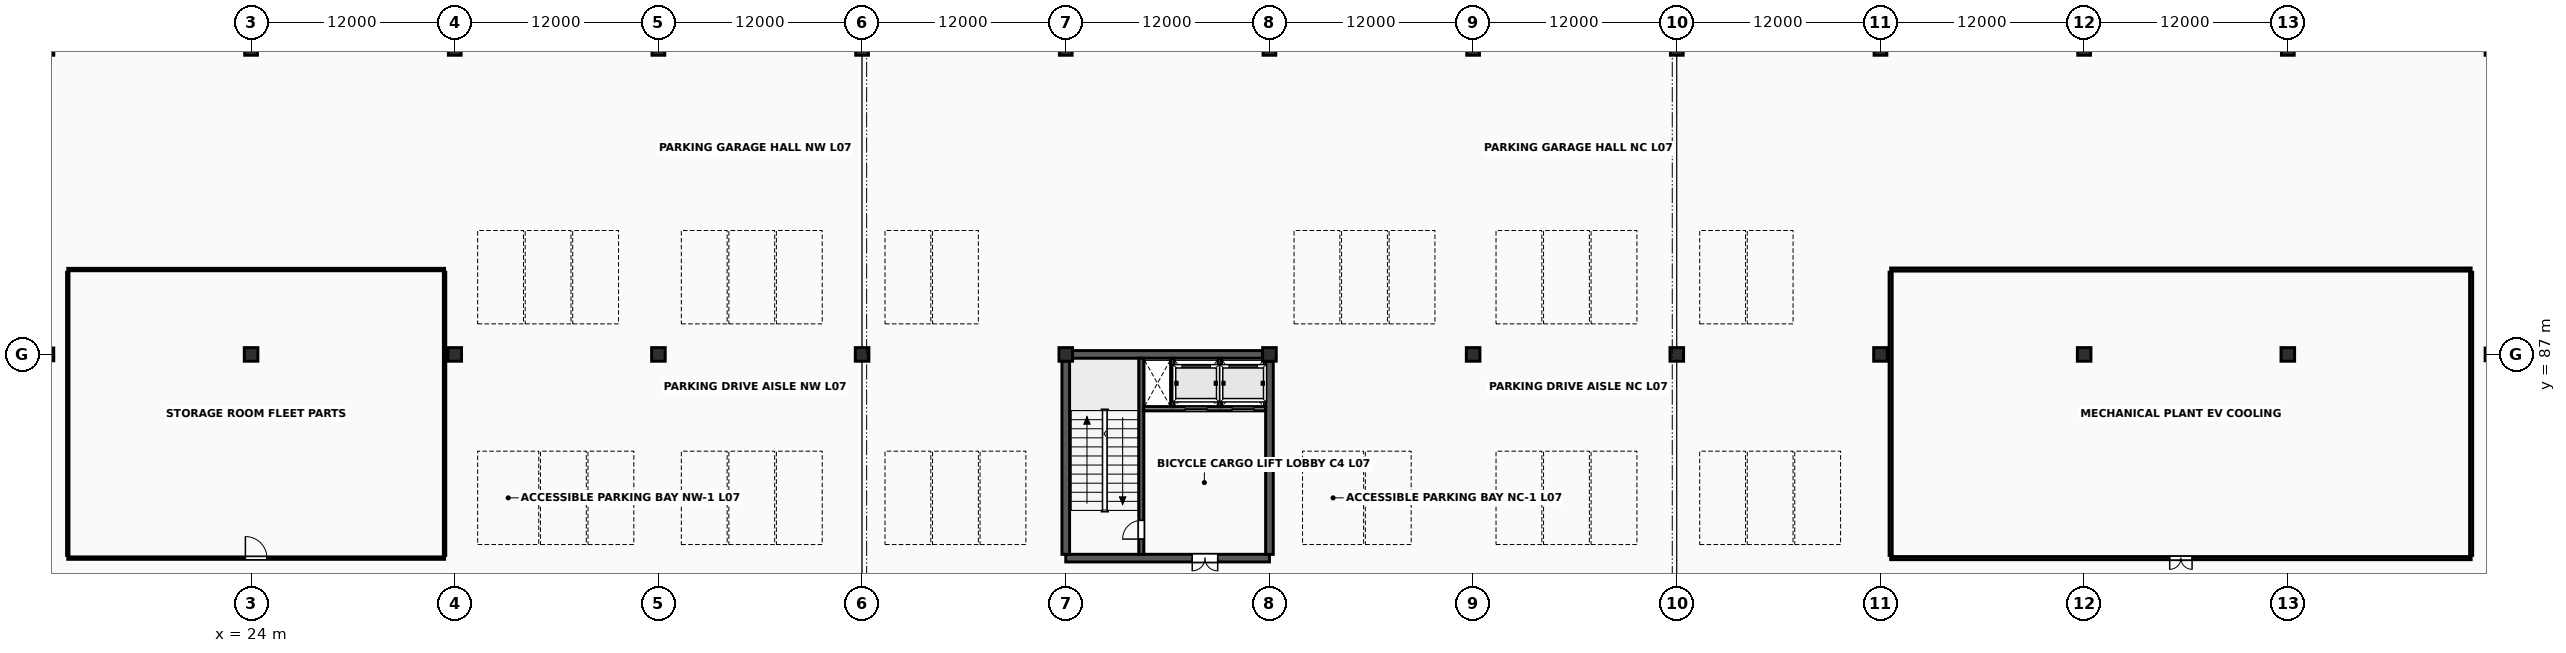
"""IFC4 building model, lengths in metres.
Left out: names, types, materials, properties, quantities, classifications, styles, units other than length and angle.
Written with IfcOpenShell. Run it as: python <this file> out.ifc"""

import sys

from ifc_helpers import new_model, si_unit, direction, frame, frame_2d, origin, origin_2d, place, context, subcontext, project, spatial, rectangle, extrude, element, fill, save


model = new_model("IFC4")
c1 = context("Model", 3, precision=1e-05, world=origin(), true_north=direction((0.0, 1.0)))
c2 = subcontext(c1, "Body", "Model", "MODEL_VIEW")
j1 = project(units=[si_unit("LENGTHUNIT", "METRE"), si_unit("PLANEANGLEUNIT", "RADIAN")], contexts=[c1])
p1 = place(None, origin())
s1 = spatial("IfcSite", under=j1, at=p1, CompositionType="ELEMENT")
p2 = place(p1, origin())
s2 = spatial("IfcBuilding", under=s1, at=p2, CompositionType="ELEMENT")
p3 = place(p2, frame((0.0, 0.0, 28.6)))
s3 = spatial("IfcBuildingStorey", under=s2, at=p3, CompositionType="ELEMENT", Elevation=28.6)
for number, where, z_axis, x_axis in (
    (1, (12.0, 87.0, 0.0), (0.0, 0.0, 1.0), (1.0, 0.0, 0.0)),
    (2, (12.0, 105.0, 0.0), (0.0, 0.0, 1.0), (1.0, 0.0, 0.0)),
):
    element("IfcColumn", number, at=place(p3, frame(where, z_axis=z_axis, x_axis=x_axis)), inside=s3, PredefinedType="COLUMN", context=c2, shape_type="SweptSolid", body=[
        extrude(rectangle(XDim=0.75, YDim=0.75, at=origin_2d()), origin(), (0.0, 0.0, 1.0), 3.8),
    ])
p4 = place(p3, frame((24.0, 87.0, 0.0), z_axis=(0.0, 0.0, 1.0), x_axis=(1.0, 0.0, 0.0)))
e3 = element("IfcColumn", 3, at=p4, inside=s3, PredefinedType="COLUMN", context=c2, shape_type="SweptSolid", body=[
    extrude(rectangle(XDim=0.8, YDim=0.8, at=origin_2d()), origin(), (0.0, 0.0, 1.0), 3.8),
])
p5 = place(p3, frame((24.0, 105.0, 0.0), z_axis=(0.0, 0.0, 1.0), x_axis=(1.0, 0.0, 0.0)))
e4 = element("IfcColumn", 4, at=p5, inside=s3, PredefinedType="COLUMN", context=c2, shape_type="SweptSolid", body=[
    extrude(rectangle(XDim=0.75, YDim=0.75, at=origin_2d()), origin(), (0.0, 0.0, 1.0), 3.8),
])
p6 = place(p3, frame((36.0, 87.0, 0.0), z_axis=(0.0, 0.0, 1.0), x_axis=(1.0, 0.0, 0.0)))
e5 = element("IfcColumn", 5, at=p6, inside=s3, PredefinedType="COLUMN", context=c2, shape_type="SweptSolid", body=[
    extrude(rectangle(XDim=0.8, YDim=0.8, at=origin_2d()), origin(), (0.0, 0.0, 1.0), 3.8),
])
p7 = place(p3, frame((36.0, 105.0, 0.0), z_axis=(0.0, 0.0, 1.0), x_axis=(1.0, 0.0, 0.0)))
e6 = element("IfcColumn", 6, at=p7, inside=s3, PredefinedType="COLUMN", context=c2, shape_type="SweptSolid", body=[
    extrude(rectangle(XDim=0.75, YDim=0.75, at=origin_2d()), origin(), (0.0, 0.0, 1.0), 3.8),
])
p8 = place(p3, frame((48.0, 87.0, 0.0), z_axis=(0.0, 0.0, 1.0), x_axis=(1.0, 0.0, 0.0)))
e7 = element("IfcColumn", 7, at=p8, inside=s3, PredefinedType="COLUMN", context=c2, shape_type="SweptSolid", body=[
    extrude(rectangle(XDim=0.8, YDim=0.8, at=origin_2d()), origin(), (0.0, 0.0, 1.0), 3.8),
])
p9 = place(p3, frame((48.0, 105.0, 0.0), z_axis=(0.0, 0.0, 1.0), x_axis=(1.0, 0.0, 0.0)))
e8 = element("IfcColumn", 8, at=p9, inside=s3, PredefinedType="COLUMN", context=c2, shape_type="SweptSolid", body=[
    extrude(rectangle(XDim=0.75, YDim=0.75, at=origin_2d()), origin(), (0.0, 0.0, 1.0), 3.8),
])
p10 = place(p3, frame((60.0, 87.0, 0.0), z_axis=(0.0, 0.0, 1.0), x_axis=(1.0, 0.0, 0.0)))
e9 = element("IfcColumn", 9, at=p10, inside=s3, PredefinedType="COLUMN", context=c2, shape_type="SweptSolid", body=[
    extrude(rectangle(XDim=0.8, YDim=0.8, at=origin_2d()), origin(), (0.0, 0.0, 1.0), 3.8),
])
p11 = place(p3, frame((60.0, 105.0, 0.0), z_axis=(0.0, 0.0, 1.0), x_axis=(1.0, 0.0, 0.0)))
e10 = element("IfcColumn", 10, at=p11, inside=s3, PredefinedType="COLUMN", context=c2, shape_type="SweptSolid", body=[
    extrude(rectangle(XDim=0.75, YDim=0.75, at=origin_2d()), origin(), (0.0, 0.0, 1.0), 3.8),
])
p12 = place(p3, frame((72.0, 87.0, 0.0), z_axis=(0.0, 0.0, 1.0), x_axis=(1.0, 0.0, 0.0)))
e11 = element("IfcColumn", 11, at=p12, inside=s3, PredefinedType="COLUMN", context=c2, shape_type="SweptSolid", body=[
    extrude(rectangle(XDim=0.8, YDim=0.8, at=origin_2d()), origin(), (0.0, 0.0, 1.0), 3.8),
])
p13 = place(p3, frame((72.0, 105.0, 0.0), z_axis=(0.0, 0.0, 1.0), x_axis=(1.0, 0.0, 0.0)))
e12 = element("IfcColumn", 12, at=p13, inside=s3, PredefinedType="COLUMN", context=c2, shape_type="SweptSolid", body=[
    extrude(rectangle(XDim=0.75, YDim=0.75, at=origin_2d()), origin(), (0.0, 0.0, 1.0), 3.8),
])
p14 = place(p3, frame((84.0, 87.0, 0.0), z_axis=(0.0, 0.0, 1.0), x_axis=(1.0, 0.0, 0.0)))
e13 = element("IfcColumn", 13, at=p14, inside=s3, PredefinedType="COLUMN", context=c2, shape_type="SweptSolid", body=[
    extrude(rectangle(XDim=0.8, YDim=0.8, at=origin_2d()), origin(), (0.0, 0.0, 1.0), 3.8),
])
p15 = place(p3, frame((84.0, 105.0, 0.0), z_axis=(0.0, 0.0, 1.0), x_axis=(1.0, 0.0, 0.0)))
e14 = element("IfcColumn", 14, at=p15, inside=s3, PredefinedType="COLUMN", context=c2, shape_type="SweptSolid", body=[
    extrude(rectangle(XDim=0.75, YDim=0.75, at=origin_2d()), origin(), (0.0, 0.0, 1.0), 3.8),
])
p16 = place(p3, frame((96.0, 87.0, 0.0), z_axis=(0.0, 0.0, 1.0), x_axis=(1.0, 0.0, 0.0)))
e15 = element("IfcColumn", 15, at=p16, inside=s3, PredefinedType="COLUMN", context=c2, shape_type="SweptSolid", body=[
    extrude(rectangle(XDim=0.8, YDim=0.8, at=origin_2d()), origin(), (0.0, 0.0, 1.0), 3.8),
])
p17 = place(p3, frame((96.0, 105.0, 0.0), z_axis=(0.0, 0.0, 1.0), x_axis=(1.0, 0.0, 0.0)))
e16 = element("IfcColumn", 16, at=p17, inside=s3, PredefinedType="COLUMN", context=c2, shape_type="SweptSolid", body=[
    extrude(rectangle(XDim=0.75, YDim=0.75, at=origin_2d()), origin(), (0.0, 0.0, 1.0), 3.8),
])
p18 = place(p3, frame((108.0, 87.0, 0.0), z_axis=(0.0, 0.0, 1.0), x_axis=(1.0, 0.0, 0.0)))
e17 = element("IfcColumn", 17, at=p18, inside=s3, PredefinedType="COLUMN", context=c2, shape_type="SweptSolid", body=[
    extrude(rectangle(XDim=0.8, YDim=0.8, at=origin_2d()), origin(), (0.0, 0.0, 1.0), 3.8),
])
p19 = place(p3, frame((108.0, 105.0, 0.0), z_axis=(0.0, 0.0, 1.0), x_axis=(1.0, 0.0, 0.0)))
e18 = element("IfcColumn", 18, at=p19, inside=s3, PredefinedType="COLUMN", context=c2, shape_type="SweptSolid", body=[
    extrude(rectangle(XDim=0.75, YDim=0.75, at=origin_2d()), origin(), (0.0, 0.0, 1.0), 3.8),
])
p20 = place(p3, frame((120.0, 87.0, 0.0), z_axis=(0.0, 0.0, 1.0), x_axis=(1.0, 0.0, 0.0)))
e19 = element("IfcColumn", 19, at=p20, inside=s3, PredefinedType="COLUMN", context=c2, shape_type="SweptSolid", body=[
    extrude(rectangle(XDim=0.8, YDim=0.8, at=origin_2d()), origin(), (0.0, 0.0, 1.0), 3.8),
])
p21 = place(p3, frame((120.0, 105.0, 0.0), z_axis=(0.0, 0.0, 1.0), x_axis=(1.0, 0.0, 0.0)))
e20 = element("IfcColumn", 20, at=p21, inside=s3, PredefinedType="COLUMN", context=c2, shape_type="SweptSolid", body=[
    extrude(rectangle(XDim=0.75, YDim=0.75, at=origin_2d()), origin(), (0.0, 0.0, 1.0), 3.8),
])
p22 = place(p3, frame((132.0, 87.0, 0.0), z_axis=(0.0, 0.0, 1.0), x_axis=(1.0, 0.0, 0.0)))
e21 = element("IfcColumn", 21, at=p22, inside=s3, PredefinedType="COLUMN", context=c2, shape_type="SweptSolid", body=[
    extrude(rectangle(XDim=0.8, YDim=0.8, at=origin_2d()), origin(), (0.0, 0.0, 1.0), 3.8),
])
p23 = place(p3, frame((132.0, 105.0, 0.0), z_axis=(0.0, 0.0, 1.0), x_axis=(1.0, 0.0, 0.0)))
e22 = element("IfcColumn", 22, at=p23, inside=s3, PredefinedType="COLUMN", context=c2, shape_type="SweptSolid", body=[
    extrude(rectangle(XDim=0.75, YDim=0.75, at=origin_2d()), origin(), (0.0, 0.0, 1.0), 3.8),
])
p24 = place(p3, frame((144.0, 87.0, 0.0), z_axis=(0.0, 0.0, 1.0), x_axis=(1.0, 0.0, 0.0)))
e23 = element("IfcColumn", 23, at=p24, inside=s3, PredefinedType="COLUMN", context=c2, shape_type="SweptSolid", body=[
    extrude(rectangle(XDim=0.8, YDim=0.8, at=origin_2d()), origin(), (0.0, 0.0, 1.0), 3.8),
])
for number, where, z_axis, x_axis in (
    (24, (144.0, 105.0, 0.0), (0.0, 0.0, 1.0), (1.0, 0.0, 0.0)),
    (25, (156.0, 87.0, 0.0), (0.0, 0.0, 1.0), (1.0, 0.0, 0.0)),
    (26, (156.0, 105.0, 0.0), (0.0, 0.0, 1.0), (1.0, 0.0, 0.0)),
):
    element("IfcColumn", number, at=place(p3, frame(where, z_axis=z_axis, x_axis=x_axis)), inside=s3, PredefinedType="COLUMN", context=c2, shape_type="SweptSolid", body=[
        extrude(rectangle(XDim=0.75, YDim=0.75, at=origin_2d()), origin(), (0.0, 0.0, 1.0), 3.8),
    ])
p25 = place(p3, frame((72.0, 75.0, 0.0), z_axis=(0.0, 0.0, 1.0), x_axis=(1.0, 0.0, 0.0)))
e27 = element("IfcWall", 27, at=p25, inside=s3, PredefinedType="SHEAR", context=c2, shape_type="SweptSolid", body=[
    extrude(rectangle(XDim=12.0, YDim=0.45, at=frame_2d((6.0, 0.0))), origin(), (0.0, 0.0, 1.0), 3.553),
])
p26 = place(p25, frame((7.45, 0.0, 0.0)))
e28 = element("IfcOpeningElement", 28, at=p26, cuts=e27, PredefinedType="OPENING", context=c2, shape_type="SweptSolid", body=[
    extrude(rectangle(XDim=1.5, YDim=2.25, at=frame_2d((0.75, 1.125))), frame((0.0, 0.24, 0.0), z_axis=(0.0, -1.0, 0.0), x_axis=(1.0, 0.0, 0.0)), (0.0, 0.0, 1.0), 0.48),
])
p27 = place(p3, frame((72.397, 87.0, 0.0), z_axis=(0.0, 0.0, 1.0), x_axis=(1.0, 0.0, 0.0)))
e29 = element("IfcWall", 29, at=p27, inside=s3, PredefinedType="SHEAR", context=c2, shape_type="SweptSolid", body=[
    extrude(rectangle(XDim=11.206, YDim=0.45, at=frame_2d((5.603, 0.0))), origin(), (0.0, 0.0, 1.0), 3.553),
])
for number, where, z_axis, x_axis in (
    (30, (72.0, 75.222, 0.0), (0.0, 0.0, 1.0), (0.0, 1.0, 0.0)),
    (31, (84.0, 75.222, 0.0), (0.0, 0.0, 1.0), (0.0, 1.0, 0.0)),
):
    element("IfcWall", number, at=place(p3, frame(where, z_axis=z_axis, x_axis=x_axis)), inside=s3, PredefinedType="SHEAR", context=c2, shape_type="SweptSolid", body=[
        extrude(rectangle(XDim=11.381, YDim=0.45, at=frame_2d((5.69, 0.0))), origin(), (0.0, 0.0, 1.0), 3.553),
    ])
p28 = place(p3, frame((76.45, 75.222, 0.0), z_axis=(0.0, 0.0, 1.0), x_axis=(0.0, 1.0, 0.0)))
e32 = element("IfcWall", 32, at=p28, inside=s3, PredefinedType="SHEAR", context=c2, shape_type="SweptSolid", body=[
    extrude(rectangle(XDim=11.556, YDim=0.3, at=frame_2d((5.778, 0.0))), origin(), (0.0, 0.0, 1.0), 3.553),
])
p29 = place(p28, frame((0.9, 0.0, 0.0)))
e33 = element("IfcOpeningElement", 33, at=p29, cuts=e32, PredefinedType="OPENING", context=c2, shape_type="SweptSolid", body=[
    extrude(rectangle(XDim=1.1, YDim=2.2, at=frame_2d((0.55, 1.1))), frame((0.0, 0.165, 0.0), z_axis=(0.0, -1.0, 0.0), x_axis=(1.0, 0.0, 0.0)), (0.0, 0.0, 1.0), 0.33),
])
p30 = place(p3, frame((76.597, 83.8, 0.0), z_axis=(0.0, 0.0, 1.0), x_axis=(1.0, 0.0, 0.0)))
e34 = element("IfcWall", 34, at=p30, inside=s3, PredefinedType="SOLIDWALL", context=c2, shape_type="SweptSolid", body=[
    extrude(rectangle(XDim=7.181, YDim=0.25, at=frame_2d((3.591, 0.0))), origin(), (0.0, 0.0, 1.0), 3.553),
])
p31 = place(p30, frame((2.433, 0.0, 0.0)))
e35 = element("IfcOpeningElement", 35, at=p31, cuts=e34, PredefinedType="OPENING", context=c2, shape_type="SweptSolid", body=[
    extrude(rectangle(XDim=1.3, YDim=2.28, at=frame_2d((0.65, 1.14))), frame((0.0, 0.14, 0.0), z_axis=(0.0, -1.0, 0.0), x_axis=(1.0, 0.0, 0.0)), (0.0, 0.0, 1.0), 0.28),
])
p32 = place(p30, frame((5.203, 0.0, 0.0)))
e36 = element("IfcOpeningElement", 36, at=p32, cuts=e34, PredefinedType="OPENING", context=c2, shape_type="SweptSolid", body=[
    extrude(rectangle(XDim=1.3, YDim=2.28, at=frame_2d((0.65, 1.14))), frame((0.0, 0.14, 0.0), z_axis=(0.0, -1.0, 0.0), x_axis=(1.0, 0.0, 0.0)), (0.0, 0.0, 1.0), 0.28),
])
for number, where, z_axis, x_axis in (
    (37, (78.28, 83.92, 0.0), (0.0, 0.0, 1.0), (0.0, 1.0, 0.0)),
    (38, (81.08, 83.92, 0.0), (0.0, 0.0, 1.0), (0.0, 1.0, 0.0)),
):
    element("IfcWall", number, at=place(p3, frame(where, z_axis=z_axis, x_axis=x_axis)), inside=s3, PredefinedType="SOLIDWALL", context=c2, shape_type="SweptSolid", body=[
        extrude(rectangle(XDim=2.855, YDim=0.2, at=frame_2d((1.427, 0.0))), origin(), (0.0, 0.0, 1.0), 3.543),
    ])
p33 = place(p3, frame((120.6, 75.0, 0.0), z_axis=(0.0, 0.0, 1.0), x_axis=(1.0, 0.0, 0.0)))
e39 = element("IfcWall", 39, at=p33, inside=s3, PredefinedType="SOLIDWALL", context=c2, shape_type="SweptSolid", body=[
    extrude(rectangle(XDim=34.2, YDim=0.18, at=frame_2d((17.1, 0.0))), origin(), (0.0, 0.0, 1.0), 2.64),
])
p34 = place(p33, frame((16.44, 0.0, 0.0)))
e40 = element("IfcOpeningElement", 40, at=p34, cuts=e39, PredefinedType="OPENING", context=c2, shape_type="SweptSolid", body=[
    extrude(rectangle(XDim=1.32, YDim=2.26, at=frame_2d((0.66, 1.13))), frame((0.0, 0.105, 0.0), z_axis=(0.0, -1.0, 0.0), x_axis=(1.0, 0.0, 0.0)), (0.0, 0.0, 1.0), 0.21),
])
p35 = place(p3, frame((120.6, 92.0, 0.0), z_axis=(0.0, 0.0, 1.0), x_axis=(1.0, 0.0, 0.0)))
e41 = element("IfcWall", 41, at=p35, inside=s3, PredefinedType="SOLIDWALL", context=c2, shape_type="SweptSolid", body=[
    extrude(rectangle(XDim=34.2, YDim=0.18, at=frame_2d((17.1, 0.0))), origin(), (0.0, 0.0, 1.0), 2.64),
])
for number, where, z_axis, x_axis in (
    (42, (120.6, 75.16, 0.0), (0.0, 0.0, 1.0), (0.0, 1.0, 0.0)),
    (43, (154.8, 75.16, 0.0), (0.0, 0.0, 1.0), (0.0, 1.0, 0.0)),
):
    element("IfcWall", number, at=place(p3, frame(where, z_axis=z_axis, x_axis=x_axis)), inside=s3, PredefinedType="SOLIDWALL", context=c2, shape_type="SweptSolid", body=[
        extrude(rectangle(XDim=16.68, YDim=0.18, at=frame_2d((8.34, 0.0))), origin(), (0.0, 0.0, 1.0), 2.64),
    ])
p36 = place(p3, frame((13.2, 75.0, 0.0), z_axis=(0.0, 0.0, 1.0), x_axis=(1.0, 0.0, 0.0)))
e44 = element("IfcWall", 44, at=p36, inside=s3, PredefinedType="PARTITIONING", context=c2, shape_type="SweptSolid", body=[
    extrude(rectangle(XDim=22.2, YDim=0.14, at=frame_2d((11.1, 0.0))), origin(), (0.0, 0.0, 1.0), 2.64),
])
p37 = place(p36, frame((10.465, 0.0, 0.0)))
e45 = element("IfcOpeningElement", 45, at=p37, cuts=e44, PredefinedType="OPENING", context=c2, shape_type="SweptSolid", body=[
    extrude(rectangle(XDim=1.27, YDim=2.27, at=frame_2d((0.635, 1.135))), frame((0.0, 0.085, 0.0), z_axis=(0.0, -1.0, 0.0), x_axis=(1.0, 0.0, 0.0)), (0.0, 0.0, 1.0), 0.17),
])
p38 = place(p3, frame((13.2, 92.0, 0.0), z_axis=(0.0, 0.0, 1.0), x_axis=(1.0, 0.0, 0.0)))
e46 = element("IfcWall", 46, at=p38, inside=s3, PredefinedType="PARTITIONING", context=c2, shape_type="SweptSolid", body=[
    extrude(rectangle(XDim=22.2, YDim=0.14, at=frame_2d((11.1, 0.0))), origin(), (0.0, 0.0, 1.0), 2.64),
])
for number, where, z_axis, x_axis in (
    (47, (13.2, 75.16, 0.0), (0.0, 0.0, 1.0), (0.0, 1.0, 0.0)),
    (48, (35.4, 75.16, 0.0), (0.0, 0.0, 1.0), (0.0, 1.0, 0.0)),
):
    element("IfcWall", number, at=place(p3, frame(where, z_axis=z_axis, x_axis=x_axis)), inside=s3, PredefinedType="PARTITIONING", context=c2, shape_type="SweptSolid", body=[
        extrude(rectangle(XDim=16.68, YDim=0.14, at=frame_2d((8.34, 0.0))), origin(), (0.0, 0.0, 1.0), 2.64),
    ])
p39 = place(p29, origin())
e49 = element("IfcDoor", 49, at=p39, inside=s3, OperationType="SINGLE_SWING_LEFT", PredefinedType="DOOR", context=c2, shape_type="SweptSolid", body=[
    extrude(rectangle(XDim=1.1, YDim=2.2, at=frame_2d((0.55, 1.1))), frame((0.0, 0.025, 0.0), z_axis=(0.0, -1.0, 0.0), x_axis=(1.0, 0.0, 0.0)), (0.0, 0.0, 1.0), 0.05),
])
fill(e33, e49)
p40 = place(p26, origin())
e50 = element("IfcDoor", 50, at=p40, inside=s3, OperationType="DOUBLE_DOOR_SINGLE_SWING", PredefinedType="DOOR", context=c2, shape_type="SweptSolid", body=[
    extrude(rectangle(XDim=1.5, YDim=2.25, at=frame_2d((0.75, 1.125))), frame((0.0, 0.025, 0.0), z_axis=(0.0, -1.0, 0.0), x_axis=(1.0, 0.0, 0.0)), (0.0, 0.0, 1.0), 0.05),
])
fill(e28, e50)
p41 = place(p31, origin())
e51 = element("IfcDoor", 51, at=p41, inside=s3, OperationType="SLIDING_TO_LEFT", PredefinedType="USERDEFINED", context=c2, shape_type="SweptSolid", body=[
    extrude(rectangle(XDim=1.3, YDim=2.28, at=frame_2d((0.65, 1.14))), frame((0.0, 0.025, 0.0), z_axis=(0.0, -1.0, 0.0), x_axis=(1.0, 0.0, 0.0)), (0.0, 0.0, 1.0), 0.05),
])
fill(e35, e51)
p42 = place(p32, origin())
e52 = element("IfcDoor", 52, at=p42, inside=s3, OperationType="SLIDING_TO_LEFT", PredefinedType="USERDEFINED", context=c2, shape_type="SweptSolid", body=[
    extrude(rectangle(XDim=1.3, YDim=2.28, at=frame_2d((0.65, 1.14))), frame((0.0, 0.025, 0.0), z_axis=(0.0, -1.0, 0.0), x_axis=(1.0, 0.0, 0.0)), (0.0, 0.0, 1.0), 0.05),
])
fill(e36, e52)
p43 = place(p34, origin())
e53 = element("IfcDoor", 53, at=p43, inside=s3, OperationType="DOUBLE_DOOR_SINGLE_SWING", PredefinedType="DOOR", context=c2, shape_type="SweptSolid", body=[
    extrude(rectangle(XDim=1.32, YDim=2.26, at=frame_2d((0.66, 1.13))), frame((0.0, 0.025, 0.0), z_axis=(0.0, -1.0, 0.0), x_axis=(1.0, 0.0, 0.0)), (0.0, 0.0, 1.0), 0.05),
])
fill(e40, e53)
p44 = place(p37, origin())
e54 = element("IfcDoor", 54, at=p44, inside=s3, OperationType="SINGLE_SWING_LEFT", PredefinedType="DOOR", context=c2, shape_type="SweptSolid", body=[
    extrude(rectangle(XDim=1.27, YDim=2.27, at=frame_2d((0.635, 1.135))), frame((0.0, 0.025, 0.0), z_axis=(0.0, -1.0, 0.0), x_axis=(1.0, 0.0, 0.0)), (0.0, 0.0, 1.0), 0.05),
])
fill(e45, e54)
save(model, sys.argv[1])
